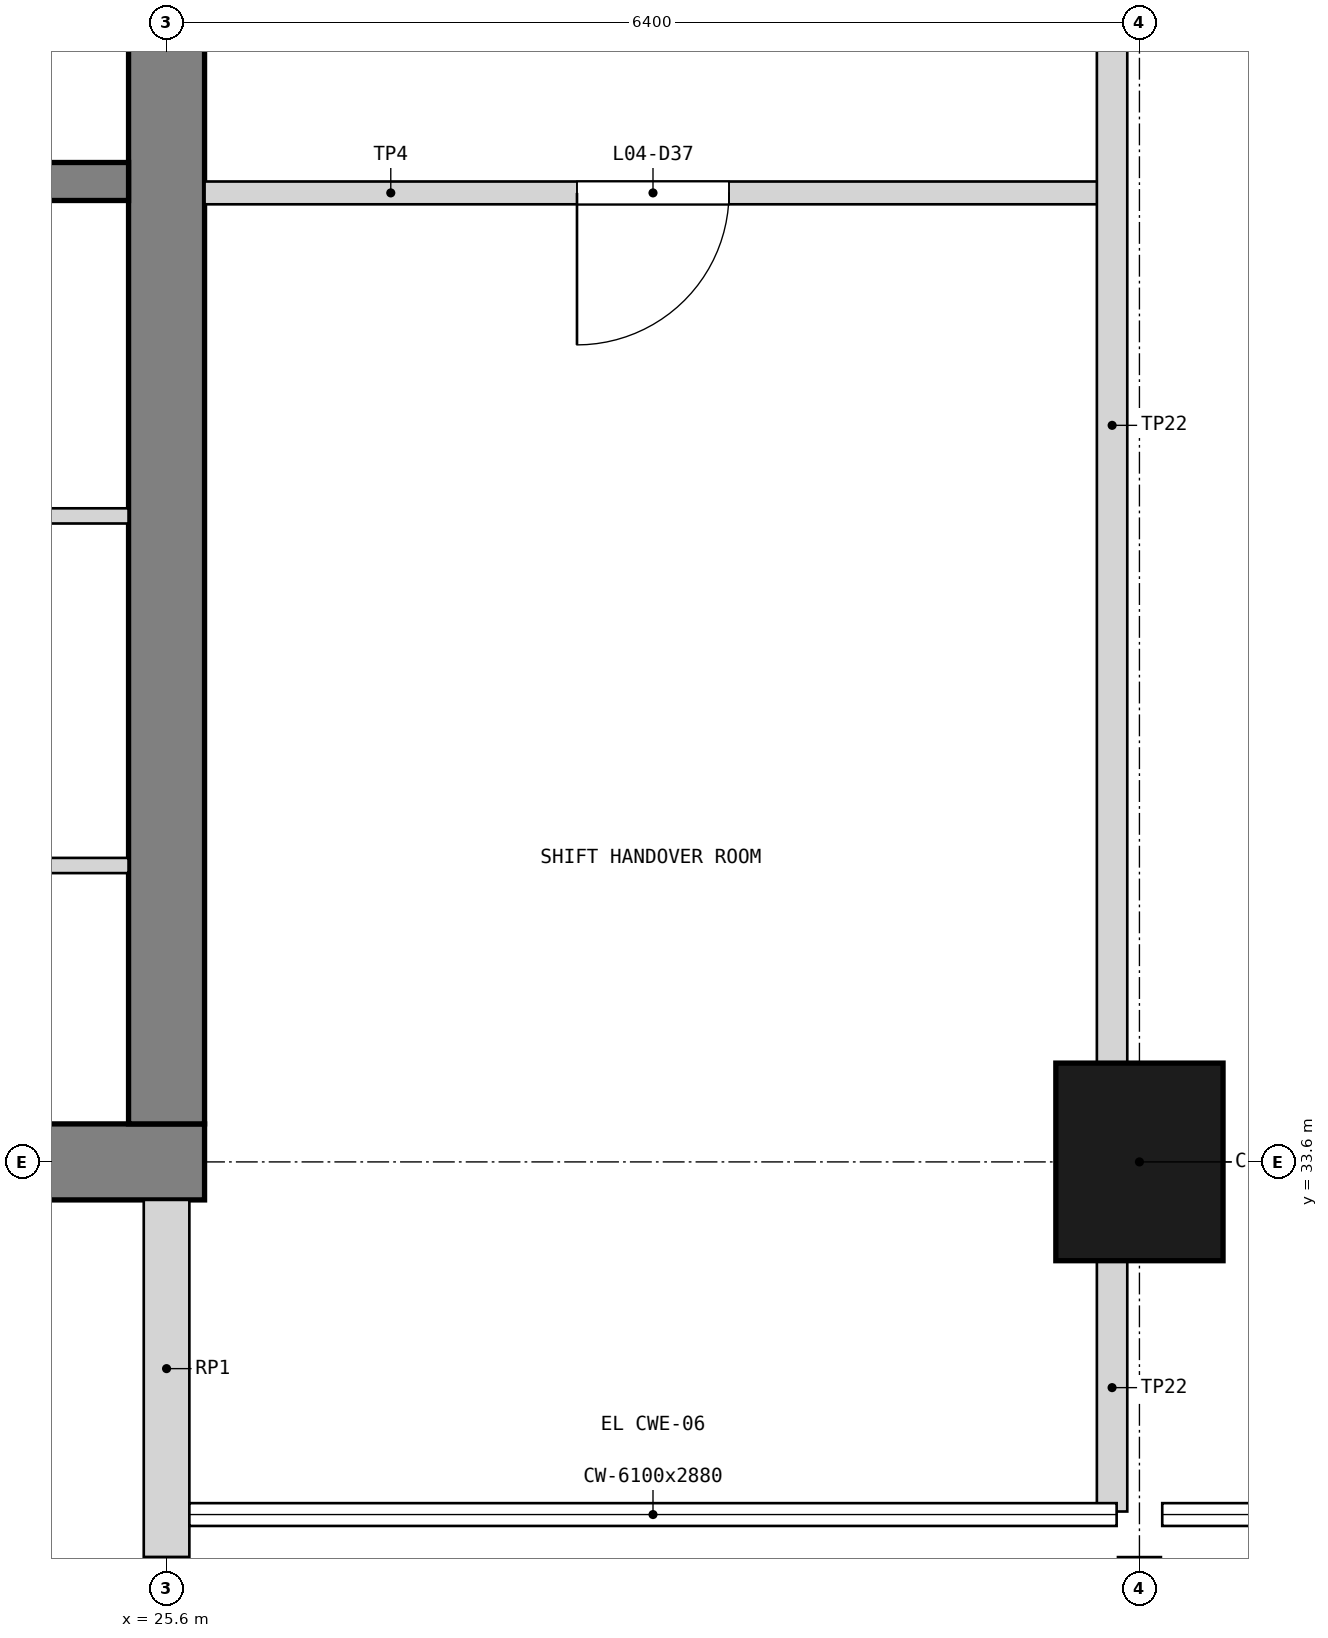
"""IFC4 building model, lengths in metres.
Left out: names, types, materials, properties, quantities, classifications, styles, units other than length and angle.
Written with IfcOpenShell. Run it as: python <this file> out.ifc"""

import sys

from ifc_helpers import new_model, si_unit, direction, frame, frame_2d, origin, origin_2d, place, context, subcontext, project, spatial, rectangle, extrude, element, fill, save


model = new_model("IFC4")
c1 = context("Model", 3, precision=1e-05, world=origin(), true_north=direction((0.0, 1.0)))
c2 = subcontext(c1, "Body", "Model", "MODEL_VIEW")
j1 = project(units=[si_unit("LENGTHUNIT", "METRE"), si_unit("PLANEANGLEUNIT", "RADIAN")], contexts=[c1])
p1 = place(None, origin())
s1 = spatial("IfcSite", under=j1, at=p1, CompositionType="ELEMENT")
p2 = place(p1, origin())
s2 = spatial("IfcBuilding", under=s1, at=p2, CompositionType="ELEMENT")
p3 = place(p2, frame((0.0, 0.0, 17.1)))
s3 = spatial("IfcBuildingStorey", under=s2, at=p3, CompositionType="ELEMENT", Elevation=17.1)
p4 = place(p3, frame((12.55, 33.6, 0.0), z_axis=(0.0, 0.0, 1.0), x_axis=(1.0, 0.0, 0.0)))
e1 = element("IfcWall", 1, at=p4, inside=s3, PredefinedType="SHEAR", context=c2, shape_type="SweptSolid", body=[
    extrude(rectangle(XDim=13.3, YDim=0.5, at=frame_2d((6.65, 0.0))), origin(), (0.0, 0.0, 1.0), 3.9),
])
p5 = place(p4, frame((1.85, 0.0, 1.0)))
e2 = element("IfcOpeningElement", 2, at=p5, cuts=e1, PredefinedType="OPENING", context=c2, shape_type="SweptSolid", body=[
    extrude(rectangle(XDim=0.4, YDim=2.0, at=frame_2d((0.2, 1.0))), frame((0.0, 0.26, 0.0), z_axis=(0.0, -1.0, 0.0), x_axis=(1.0, 0.0, 0.0)), (0.0, 0.0, 1.0), 0.52),
])
p6 = place(p3, frame((25.6, 33.85, 0.0), z_axis=(0.0, 0.0, 1.0), x_axis=(0.0, 1.0, 0.0)))
e3 = element("IfcWall", 3, at=p6, inside=s3, PredefinedType="SHEAR", context=c2, shape_type="SweptSolid", body=[
    extrude(rectangle(XDim=18.7, YDim=0.5, at=frame_2d((9.35, 0.0))), origin(), (0.0, 0.0, 1.0), 3.9),
])
p7 = place(p6, frame((8.35, 0.0, 0.0)))
e4 = element("IfcOpeningElement", 4, at=p7, cuts=e3, PredefinedType="OPENING", context=c2, shape_type="SweptSolid", body=[
    extrude(rectangle(XDim=2.0, YDim=2.1, at=frame_2d((1.0, 1.05))), frame((0.0, 0.26, 0.0), z_axis=(0.0, -1.0, 0.0), x_axis=(1.0, 0.0, 0.0)), (0.0, 0.0, 1.0), 0.52),
])
p8 = place(p3, frame((32.0, 33.6, 0.0), z_axis=(0.0, 0.0, 1.0), x_axis=(1.0, 0.0, 0.0)))
e5 = element("IfcColumn", 5, at=p8, inside=s3, PredefinedType="COLUMN", context=c2, shape_type="SweptSolid", body=[
    extrude(rectangle(XDim=1.1, YDim=1.3, at=origin_2d()), origin(), (0.0, 0.0, 1.0), 3.9),
])
p9 = place(p3, frame((25.6, 31.0, 0.0), z_axis=(0.0, 0.0, 1.0), x_axis=(0.0, 1.0, 0.0)))
e6 = element("IfcWall", 6, at=p9, inside=s3, PredefinedType="SOLIDWALL", context=c2, shape_type="SweptSolid", body=[
    extrude(rectangle(XDim=2.35, YDim=0.3, at=frame_2d((1.175, 0.0))), origin(), (0.0, 0.0, 1.0), 2.88),
])
p10 = place(p3, frame((19.875, 40.05, 0.0), z_axis=(0.0, 0.0, 1.0), x_axis=(1.0, 0.0, 0.0)))
e7 = element("IfcWall", 7, at=p10, inside=s3, PredefinedType="SOLIDWALL", context=c2, shape_type="SweptSolid", body=[
    extrude(rectangle(XDim=5.475, YDim=0.25, at=frame_2d((2.738, 0.0))), origin(), (0.0, 0.0, 1.0), 3.6),
])
p11 = place(p3, frame((20.125, 35.55, 0.0), z_axis=(0.0, 0.0, 1.0), x_axis=(1.0, 0.0, 0.0)))
e8 = element("IfcWall", 8, at=p11, inside=s3, PredefinedType="PARTITIONING", context=c2, shape_type="SweptSolid", body=[
    extrude(rectangle(XDim=5.225, YDim=0.1, at=frame_2d((2.613, 0.0))), origin(), (0.0, 0.0, 1.0), 3.6),
])
p12 = place(p3, frame((21.675, 37.85, 0.0), z_axis=(0.0, 0.0, 1.0), x_axis=(1.0, 0.0, 0.0)))
e9 = element("IfcWall", 9, at=p12, inside=s3, PredefinedType="PARTITIONING", context=c2, shape_type="SweptSolid", body=[
    extrude(rectangle(XDim=3.675, YDim=0.1, at=frame_2d((1.837, 0.0))), origin(), (0.0, 0.0, 1.0), 3.6),
])
p13 = place(p3, frame((25.85, 39.975, 0.0), z_axis=(0.0, 0.0, 1.0), x_axis=(1.0, 0.0, 0.0)))
e10 = element("IfcWall", 10, at=p13, inside=s3, PredefinedType="PARTITIONING", context=c2, shape_type="SweptSolid", body=[
    extrude(rectangle(XDim=5.97, YDim=0.15, at=frame_2d((2.985, 0.0))), origin(), (0.0, 0.0, 1.0), 3.68),
])
p14 = place(p13, frame((2.45, 0.0, 0.0)))
e11 = element("IfcOpeningElement", 11, at=p14, cuts=e10, PredefinedType="OPENING", context=c2, shape_type="SweptSolid", body=[
    extrude(rectangle(XDim=1.0, YDim=2.1, at=frame_2d((0.5, 1.05))), frame((0.0, 0.085, 0.0), z_axis=(0.0, -1.0, 0.0), x_axis=(1.0, 0.0, 0.0)), (0.0, 0.0, 1.0), 0.17),
])
p15 = place(p3, frame((31.82, 31.3, 0.0), z_axis=(0.0, 0.0, 1.0), x_axis=(0.0, 1.0, 0.0)))
e12 = element("IfcWall", 12, at=p15, inside=s3, PredefinedType="PARTITIONING", context=c2, shape_type="SweptSolid", body=[
    extrude(rectangle(XDim=1.67, YDim=0.2, at=frame_2d((0.835, 0.0))), origin(), (0.0, 0.0, 1.0), 2.78),
])
p16 = place(p3, frame((31.82, 34.23, 0.0), z_axis=(0.0, 0.0, 1.0), x_axis=(0.0, 1.0, 0.0)))
e13 = element("IfcWall", 13, at=p16, inside=s3, PredefinedType="PARTITIONING", context=c2, shape_type="SweptSolid", body=[
    extrude(rectangle(XDim=8.47, YDim=0.2, at=frame_2d((4.235, 0.0))), origin(), (0.0, 0.0, 1.0), 2.78),
])
p17 = place(p14, frame((1.0, 0.0, 0.0), z_axis=(0.0, 0.0, 1.0), x_axis=(-1.0, 0.0, 0.0)))
e14 = element("IfcDoor", 14, at=p17, inside=s3, OperationType="SINGLE_SWING_RIGHT", PredefinedType="DOOR", context=c2, shape_type="SweptSolid", body=[
    extrude(rectangle(XDim=1.0, YDim=2.1, at=frame_2d((0.5, 1.05))), frame((0.0, 0.025, 0.0), z_axis=(0.0, -1.0, 0.0), x_axis=(1.0, 0.0, 0.0)), (0.0, 0.0, 1.0), 0.05),
])
fill(e11, e14)
save(model, sys.argv[1])
